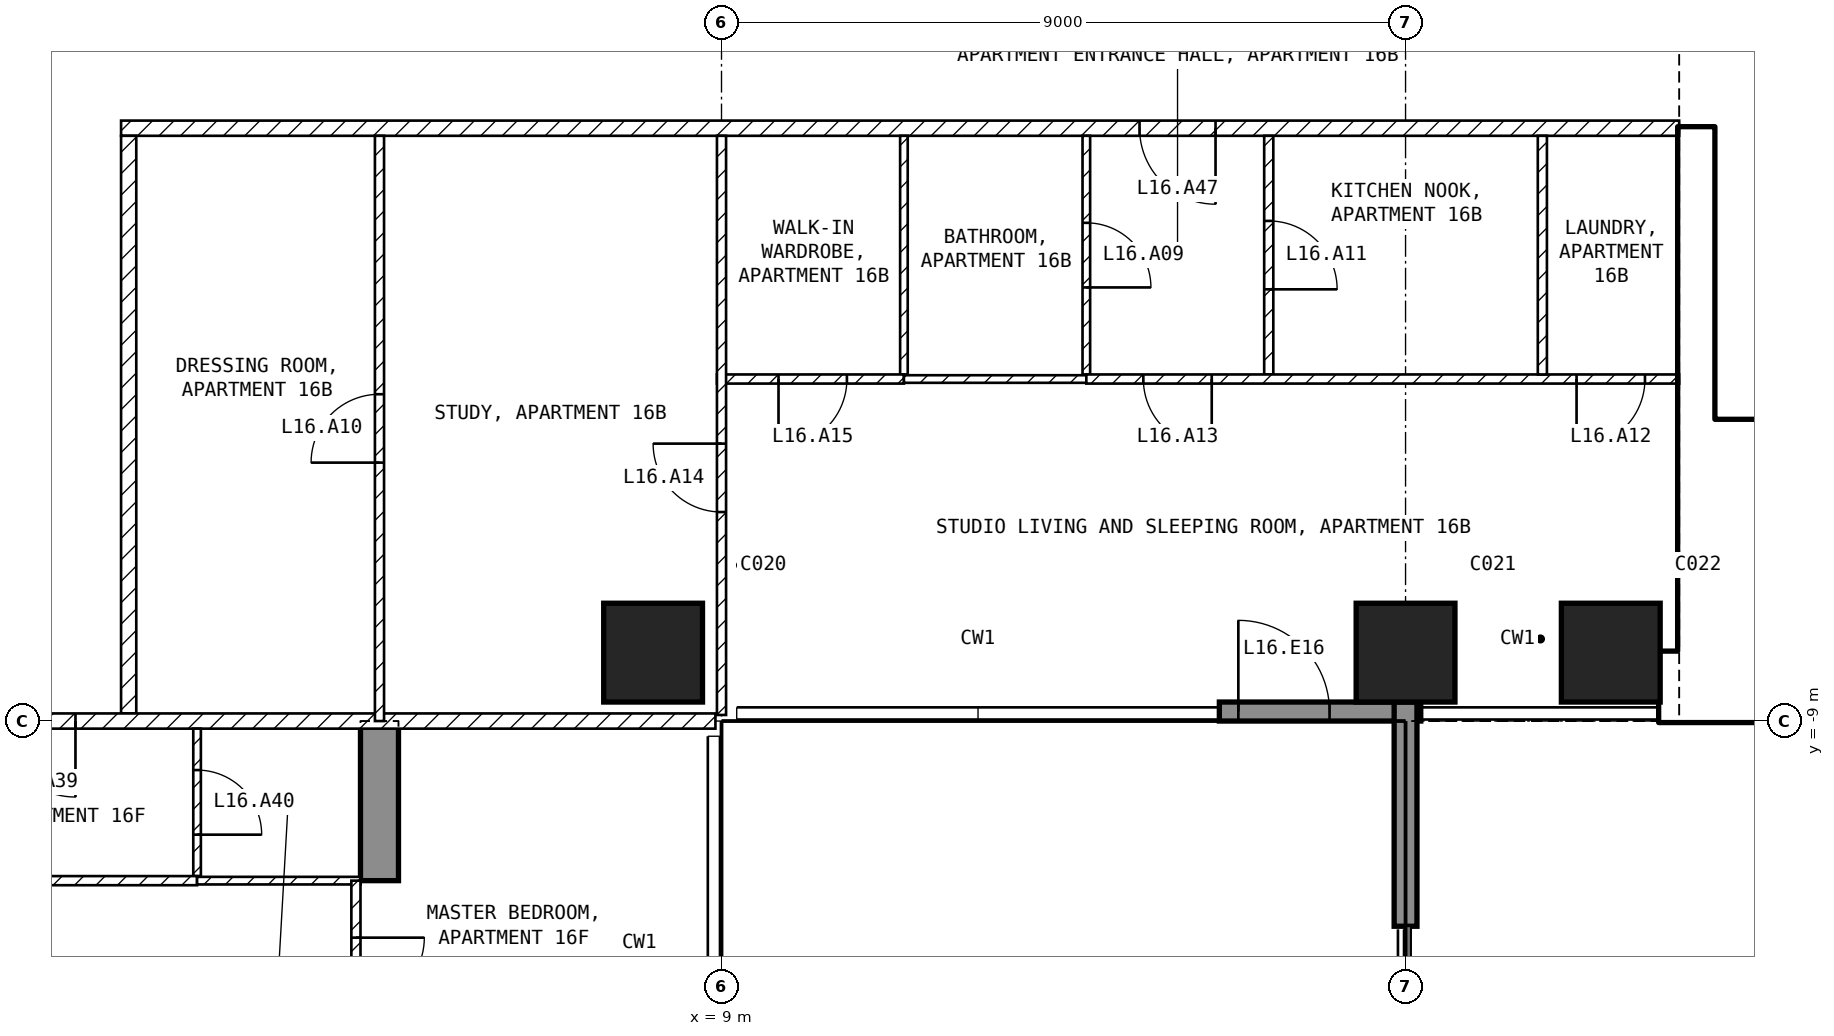
"""IFC4 building model, lengths in metres.
Left out: names, types, materials, properties, quantities, classifications, styles, units other than length and angle.
Written with IfcOpenShell. Run it as: python <this file> out.ifc"""

import sys

from ifc_helpers import new_model, si_unit, direction, frame, frame_2d, origin, origin_2d, place, context, subcontext, project, spatial, polyline, rectangle, outline, extrude, element, fill, save


model = new_model("IFC4")
c1 = context("Model", 3, precision=1e-05, world=origin(), true_north=direction((0.0, 1.0)))
c2 = subcontext(c1, "Body", "Model", "MODEL_VIEW")
j1 = project(units=[si_unit("LENGTHUNIT", "METRE"), si_unit("PLANEANGLEUNIT", "RADIAN")], contexts=[c1])
p1 = place(None, origin())
s1 = spatial("IfcSite", under=j1, at=p1, CompositionType="ELEMENT")
p2 = place(p1, origin())
s2 = spatial("IfcBuilding", under=s1, at=p2, CompositionType="ELEMENT")
p3 = place(p2, frame((0.0, 0.0, 75.0)))
s3 = spatial("IfcBuildingStorey", under=s2, at=p3, CompositionType="ELEMENT", Elevation=75.0)
for number, where, z_axis, x_axis in (
    (1, (8.1, -8.1, -0.25), (0.0, 0.0, 1.0), (1.0, 0.0, 0.0)),
    (2, (18.0, -8.1, -0.25), (0.0, 0.0, 1.0), (1.0, 0.0, 0.0)),
    (3, (20.7, -8.1, -0.25), (0.0, 0.0, 1.0), (1.0, 0.0, 0.0)),
):
    element("IfcColumn", number, at=place(p3, frame(where, z_axis=z_axis, x_axis=x_axis)), inside=s3, PredefinedType="COLUMN", context=c2, shape_type="SweptSolid", body=[
        extrude(rectangle(XDim=1.3, YDim=1.3, at=origin_2d()), origin(), (0.0, 0.0, 1.0), 3.5),
    ])
p4 = place(p3, frame((4.25, -25.45, -0.25), z_axis=(1.0, 0.0, 0.0), x_axis=(0.0, 1.0, 0.0)))
e4 = element("IfcWall", 4, at=p4, inside=s3, PredefinedType="SHEAR", context=c2, shape_type="SweptSolid", body=[
    extrude(outline(polyline([(0.0, 0.0), (4.15, 0.0), (4.15, 2.65), (6.55, 2.65), (6.55, 0.0), (11.95, 0.0), (11.95, 2.65), (14.35, 2.65), (14.35, 0.0), (16.45, 0.0), (16.45, 3.5), (0.0, 3.5), (0.0, 0.0)])), origin(), (0.0, 0.0, 1.0), 0.5),
])
p5 = place(p3, frame((15.55, -8.875, 0.0), z_axis=(0.0, 0.0, 1.0), x_axis=(1.0, 0.0, 0.0)))
e5 = element("IfcWall", 5, at=p5, inside=s3, PredefinedType="SOLIDWALL", context=c2, shape_type="SweptSolid", body=[
    extrude(rectangle(XDim=2.65, YDim=0.25, at=frame_2d((1.325, 0.0))), origin(), (0.0, 0.0, 1.0), 3.25),
])
p6 = place(p5, frame((0.25, 0.0, 0.0)))
e6 = element("IfcOpeningElement", 6, at=p6, cuts=e5, PredefinedType="OPENING", context=c2, shape_type="SweptSolid", body=[
    extrude(rectangle(XDim=1.2, YDim=2.4, at=frame_2d((0.6, 1.2))), frame((0.0, 0.135, 0.0), z_axis=(0.0, -1.0, 0.0), x_axis=(1.0, 0.0, 0.0)), (0.0, 0.0, 1.0), 0.27),
])
p7 = place(p3, frame((18.0, -8.75, 0.0), z_axis=(0.0, 0.0, 1.0), x_axis=(0.0, -1.0, 0.0)))
e7 = element("IfcWall", 7, at=p7, inside=s3, PredefinedType="SOLIDWALL", context=c2, shape_type="SweptSolid", body=[
    extrude(rectangle(XDim=2.95, YDim=0.3, at=frame_2d((1.475, 0.0))), origin(), (0.0, 0.0, 1.0), 3.25),
])
p8 = place(p3, frame((21.35, -8.55, 0.0), z_axis=(0.0, 0.0, 1.0), x_axis=(1.0, 0.0, 0.0)))
e8 = element("IfcWall", 8, at=p8, inside=s3, PredefinedType="SHEAR", context=c2, shape_type="SweptSolid", body=[
    extrude(rectangle(XDim=11.05, YDim=0.9, at=frame_2d((5.525, 0.0))), origin(), (0.0, 0.0, 1.0), 3.25),
])
p9 = place(p3, frame((21.825, -8.1, 0.0), z_axis=(0.0, 0.0, 1.0), x_axis=(0.0, 1.0, 0.0)))
e9 = element("IfcWall", 9, at=p9, inside=s3, PredefinedType="SHEAR", context=c2, shape_type="SweptSolid", body=[
    extrude(rectangle(XDim=6.9, YDim=0.45, at=frame_2d((3.45, 0.0))), origin(), (0.0, 0.0, 1.0), 3.25),
])
p10 = place(p3, frame((22.05, -5.15, 0.0), z_axis=(0.0, 0.0, 1.0), x_axis=(1.0, 0.0, 0.0)))
e10 = element("IfcWall", 10, at=p10, inside=s3, PredefinedType="SOLIDWALL", context=c2, shape_type="SweptSolid", body=[
    extrude(rectangle(XDim=6.3, YDim=0.2, at=frame_2d((3.15, 0.0))), origin(), (0.0, 0.0, 1.0), 3.25),
])
p11 = place(p10, frame((0.2, 0.0, 0.0)))
e11 = element("IfcOpeningElement", 11, at=p11, cuts=e10, PredefinedType="OPENING", context=c2, shape_type="SweptSolid", body=[
    extrude(rectangle(XDim=1.0, YDim=2.1, at=frame_2d((0.5, 1.05))), frame((0.0, 0.11, 0.0), z_axis=(0.0, -1.0, 0.0), x_axis=(1.0, 0.0, 0.0)), (0.0, 0.0, 1.0), 0.22),
])
p12 = place(p3, frame((21.6, -1.2, 0.0), z_axis=(0.0, 0.0, 1.0), x_axis=(-1.0, 0.0, 0.0)))
e12 = element("IfcWall", 12, at=p12, inside=s3, PredefinedType="PARTITIONING", context=c2, shape_type="SweptSolid", body=[
    extrude(rectangle(XDim=20.5, YDim=0.2, at=frame_2d((10.25, 0.0))), origin(), (0.0, 0.0, 1.0), 3.25),
])
p13 = place(p12, frame((6.1, 0.0, 0.0)))
e13 = element("IfcOpeningElement", 13, at=p13, cuts=e12, PredefinedType="OPENING", context=c2, shape_type="SweptSolid", body=[
    extrude(rectangle(XDim=1.0, YDim=2.1, at=frame_2d((0.5, 1.05))), frame((0.0, 0.11, 0.0), z_axis=(0.0, -1.0, 0.0), x_axis=(1.0, 0.0, 0.0)), (0.0, 0.0, 1.0), 0.22),
])
p14 = place(p3, frame((1.2, -1.3, 0.0), z_axis=(0.0, 0.0, 1.0), x_axis=(0.0, -1.0, 0.0)))
e14 = element("IfcWall", 14, at=p14, inside=s3, PredefinedType="PARTITIONING", context=c2, shape_type="SweptSolid", body=[
    extrude(rectangle(XDim=7.6, YDim=0.2, at=frame_2d((3.8, 0.0))), origin(), (0.0, 0.0, 1.0), 3.25),
])
p15 = place(p3, frame((8.92, -9.0, 0.0), z_axis=(0.0, 0.0, 1.0), x_axis=(-1.0, 0.0, 0.0)))
e15 = element("IfcWall", 15, at=p15, inside=s3, PredefinedType="PARTITIONING", context=c2, shape_type="SweptSolid", body=[
    extrude(rectangle(XDim=17.84, YDim=0.2, at=frame_2d((8.92, 0.0))), origin(), (0.0, 0.0, 1.0), 3.25),
])
p16 = place(p15, frame((8.42, 0.0, 0.0)))
e16 = element("IfcOpeningElement", 16, at=p16, cuts=e15, PredefinedType="OPENING", context=c2, shape_type="SweptSolid", body=[
    extrude(rectangle(XDim=1.0, YDim=2.1, at=frame_2d((0.5, 1.05))), frame((0.0, 0.11, 0.0), z_axis=(0.0, -1.0, 0.0), x_axis=(1.0, 0.0, 0.0)), (0.0, 0.0, 1.0), 0.22),
])
p17 = place(p3, frame((11.4, -1.3, 0.0), z_axis=(0.0, 0.0, 1.0), x_axis=(0.0, -1.0, 0.0)))
e17 = element("IfcWall", 17, at=p17, inside=s3, PredefinedType="PARTITIONING", context=c2, shape_type="SweptSolid", body=[
    extrude(rectangle(XDim=3.14, YDim=0.1, at=frame_2d((1.57, 0.0))), origin(), (0.0, 0.0, 1.0), 3.25),
])
p18 = place(p3, frame((11.4, -4.5, 0.0), z_axis=(0.0, 0.0, 1.0), x_axis=(-1.0, 0.0, 0.0)))
e18 = element("IfcWall", 18, at=p18, inside=s3, PredefinedType="PARTITIONING", context=c2, shape_type="SweptSolid", body=[
    extrude(rectangle(XDim=2.46, YDim=0.12, at=frame_2d((1.23, 0.0))), origin(), (0.0, 0.0, 1.0), 3.25),
])
p19 = place(p18, frame((0.75, 0.0, 0.0)))
e19 = element("IfcOpeningElement", 19, at=p19, cuts=e18, PredefinedType="OPENING", context=c2, shape_type="SweptSolid", body=[
    extrude(rectangle(XDim=0.9, YDim=2.1, at=frame_2d((0.45, 1.05))), frame((0.0, 0.07, 0.0), z_axis=(0.0, -1.0, 0.0), x_axis=(1.0, 0.0, 0.0)), (0.0, 0.0, 1.0), 0.14),
])
p20 = place(p3, frame((9.0, -8.92, 0.0), z_axis=(0.0, 0.0, 1.0), x_axis=(0.0, 1.0, 0.0)))
e20 = element("IfcWall", 20, at=p20, inside=s3, PredefinedType="PARTITIONING", context=c2, shape_type="SweptSolid", body=[
    extrude(rectangle(XDim=7.62, YDim=0.12, at=frame_2d((3.81, 0.0))), origin(), (0.0, 0.0, 1.0), 3.25),
])
p21 = place(p20, frame((2.67, 0.0, 0.0)))
e21 = element("IfcOpeningElement", 21, at=p21, cuts=e20, PredefinedType="OPENING", context=c2, shape_type="SweptSolid", body=[
    extrude(rectangle(XDim=0.9, YDim=2.1, at=frame_2d((0.45, 1.05))), frame((0.0, 0.07, 0.0), z_axis=(0.0, -1.0, 0.0), x_axis=(1.0, 0.0, 0.0)), (0.0, 0.0, 1.0), 0.14),
])
p22 = place(p3, frame((13.8, -1.3, 0.0), z_axis=(0.0, 0.0, 1.0), x_axis=(0.0, -1.0, 0.0)))
e22 = element("IfcWall", 22, at=p22, inside=s3, PredefinedType="PARTITIONING", context=c2, shape_type="SweptSolid", body=[
    extrude(rectangle(XDim=3.14, YDim=0.1, at=frame_2d((1.57, 0.0))), origin(), (0.0, 0.0, 1.0), 3.25),
])
p23 = place(p22, frame((1.145, 0.0, 0.0)))
e23 = element("IfcOpeningElement", 23, at=p23, cuts=e22, PredefinedType="OPENING", context=c2, shape_type="SweptSolid", body=[
    extrude(rectangle(XDim=0.85, YDim=2.1, at=frame_2d((0.425, 1.05))), frame((0.0, 0.06, 0.0), z_axis=(0.0, -1.0, 0.0), x_axis=(1.0, 0.0, 0.0)), (0.0, 0.0, 1.0), 0.12),
])
p24 = place(p3, frame((13.8, -4.5, 0.0), z_axis=(0.0, 0.0, 1.0), x_axis=(-1.0, 0.0, 0.0)))
e24 = element("IfcWall", 24, at=p24, inside=s3, PredefinedType="PARTITIONING", context=c2, shape_type="SweptSolid", body=[
    extrude(rectangle(XDim=2.4, YDim=0.1, at=frame_2d((1.2, 0.0))), origin(), (0.0, 0.0, 1.0), 3.25),
])
p25 = place(p3, frame((16.2, -1.3, 0.0), z_axis=(0.0, 0.0, 1.0), x_axis=(0.0, -1.0, 0.0)))
e25 = element("IfcWall", 25, at=p25, inside=s3, PredefinedType="PARTITIONING", context=c2, shape_type="SweptSolid", body=[
    extrude(rectangle(XDim=3.14, YDim=0.12, at=frame_2d((1.57, 0.0))), origin(), (0.0, 0.0, 1.0), 3.25),
])
p26 = place(p25, frame((1.12, 0.0, 0.0)))
e26 = element("IfcOpeningElement", 26, at=p26, cuts=e25, PredefinedType="OPENING", context=c2, shape_type="SweptSolid", body=[
    extrude(rectangle(XDim=0.9, YDim=2.1, at=frame_2d((0.45, 1.05))), frame((0.0, 0.07, 0.0), z_axis=(0.0, -1.0, 0.0), x_axis=(1.0, 0.0, 0.0)), (0.0, 0.0, 1.0), 0.14),
])
p27 = place(p3, frame((21.6, -4.5, 0.0), z_axis=(0.0, 0.0, 1.0), x_axis=(-1.0, 0.0, 0.0)))
e27 = element("IfcWall", 27, at=p27, inside=s3, PredefinedType="PARTITIONING", context=c2, shape_type="SweptSolid", body=[
    extrude(rectangle(XDim=7.8, YDim=0.12, at=frame_2d((3.9, 0.0))), origin(), (0.0, 0.0, 1.0), 3.25),
])
p28 = place(p27, frame((0.45, 0.0, 0.0)))
e28 = element("IfcOpeningElement", 28, at=p28, cuts=e27, PredefinedType="OPENING", context=c2, shape_type="SweptSolid", body=[
    extrude(rectangle(XDim=0.9, YDim=2.1, at=frame_2d((0.45, 1.05))), frame((0.0, 0.07, 0.0), z_axis=(0.0, -1.0, 0.0), x_axis=(1.0, 0.0, 0.0)), (0.0, 0.0, 1.0), 0.14),
])
p29 = place(p27, frame((6.15, 0.0, 0.0)))
e29 = element("IfcOpeningElement", 29, at=p29, cuts=e27, PredefinedType="OPENING", context=c2, shape_type="SweptSolid", body=[
    extrude(rectangle(XDim=0.9, YDim=2.1, at=frame_2d((0.45, 1.05))), frame((0.0, 0.07, 0.0), z_axis=(0.0, -1.0, 0.0), x_axis=(1.0, 0.0, 0.0)), (0.0, 0.0, 1.0), 0.14),
])
p30 = place(p3, frame((19.8, -1.3, 0.0), z_axis=(0.0, 0.0, 1.0), x_axis=(0.0, -1.0, 0.0)))
e30 = element("IfcWall", 30, at=p30, inside=s3, PredefinedType="PARTITIONING", context=c2, shape_type="SweptSolid", body=[
    extrude(rectangle(XDim=3.14, YDim=0.12, at=frame_2d((1.57, 0.0))), origin(), (0.0, 0.0, 1.0), 3.25),
])
p31 = place(p3, frame((4.5, -9.0, 0.0), z_axis=(0.0, 0.0, 1.0), x_axis=(0.0, 1.0, 0.0)))
e31 = element("IfcWall", 31, at=p31, inside=s3, PredefinedType="PARTITIONING", context=c2, shape_type="SweptSolid", body=[
    extrude(rectangle(XDim=7.7, YDim=0.12, at=frame_2d((3.85, 0.0))), origin(), (0.0, 0.0, 1.0), 3.25),
])
p32 = place(p31, frame((3.4, 0.0, 0.0)))
e32 = element("IfcOpeningElement", 32, at=p32, cuts=e31, PredefinedType="OPENING", context=c2, shape_type="SweptSolid", body=[
    extrude(rectangle(XDim=0.9, YDim=2.1, at=frame_2d((0.45, 1.05))), frame((0.0, 0.07, 0.0), z_axis=(0.0, -1.0, 0.0), x_axis=(1.0, 0.0, 0.0)), (0.0, 0.0, 1.0), 0.14),
])
p33 = place(p3, frame((2.1, -9.1, 0.0), z_axis=(0.0, 0.0, 1.0), x_axis=(0.0, -1.0, 0.0)))
e33 = element("IfcWall", 33, at=p33, inside=s3, PredefinedType="PARTITIONING", context=c2, shape_type="SweptSolid", body=[
    extrude(rectangle(XDim=1.94, YDim=0.1, at=frame_2d((0.97, 0.0))), origin(), (0.0, 0.0, 1.0), 3.25),
])
p34 = place(p33, frame((0.545, 0.0, 0.0)))
e34 = element("IfcOpeningElement", 34, at=p34, cuts=e33, PredefinedType="OPENING", context=c2, shape_type="SweptSolid", body=[
    extrude(rectangle(XDim=0.85, YDim=2.1, at=frame_2d((0.425, 1.05))), frame((0.0, 0.06, 0.0), z_axis=(0.0, -1.0, 0.0), x_axis=(1.0, 0.0, 0.0)), (0.0, 0.0, 1.0), 0.12),
])
p35 = place(p3, frame((2.1, -11.1, 0.0), z_axis=(0.0, 0.0, 1.0), x_axis=(-1.0, 0.0, 0.0)))
e35 = element("IfcWall", 35, at=p35, inside=s3, PredefinedType="PARTITIONING", context=c2, shape_type="SweptSolid", body=[
    extrude(rectangle(XDim=6.35, YDim=0.12, at=frame_2d((3.175, 0.0))), origin(), (0.0, 0.0, 1.0), 3.25),
])
p36 = place(p35, frame((2.725, 0.0, 0.0)))
e36 = element("IfcOpeningElement", 36, at=p36, cuts=e35, PredefinedType="OPENING", context=c2, shape_type="SweptSolid", body=[
    extrude(rectangle(XDim=0.9, YDim=2.1, at=frame_2d((0.45, 1.05))), frame((0.0, 0.07, 0.0), z_axis=(0.0, -1.0, 0.0), x_axis=(1.0, 0.0, 0.0)), (0.0, 0.0, 1.0), 0.14),
])
p37 = place(p3, frame((4.25, -11.1, 0.0), z_axis=(0.0, 0.0, 1.0), x_axis=(-1.0, 0.0, 0.0)))
e37 = element("IfcWall", 37, at=p37, inside=s3, PredefinedType="PARTITIONING", context=c2, shape_type="SweptSolid", body=[
    extrude(rectangle(XDim=2.15, YDim=0.1, at=frame_2d((1.075, 0.0))), origin(), (0.0, 0.0, 1.0), 3.25),
])
p38 = place(p3, frame((4.19, -11.1, 0.0), z_axis=(0.0, 0.0, 1.0), x_axis=(0.0, -1.0, 0.0)))
e38 = element("IfcWall", 38, at=p38, inside=s3, PredefinedType="PARTITIONING", context=c2, shape_type="SweptSolid", body=[
    extrude(rectangle(XDim=2.4, YDim=0.12, at=frame_2d((1.2, 0.0))), origin(), (0.0, 0.0, 1.0), 2.4),
])
p39 = place(p38, frame((0.75, 0.0, 0.0)))
e39 = element("IfcOpeningElement", 39, at=p39, cuts=e38, PredefinedType="OPENING", context=c2, shape_type="SweptSolid", body=[
    extrude(rectangle(XDim=0.9, YDim=2.1, at=frame_2d((0.45, 1.05))), frame((0.0, 0.07, 0.0), z_axis=(0.0, -1.0, 0.0), x_axis=(1.0, 0.0, 0.0)), (0.0, 0.0, 1.0), 0.14),
])
p40 = place(p6, origin())
e40 = element("IfcDoor", 40, at=p40, inside=s3, OperationType="SINGLE_SWING_LEFT", PredefinedType="DOOR", context=c2, shape_type="SweptSolid", body=[
    extrude(rectangle(XDim=1.2, YDim=2.4, at=frame_2d((0.6, 1.2))), frame((0.0, 0.025, 0.0), z_axis=(0.0, -1.0, 0.0), x_axis=(1.0, 0.0, 0.0)), (0.0, 0.0, 1.0), 0.05),
])
fill(e6, e40)
p41 = place(p11, origin())
e41 = element("IfcDoor", 41, at=p41, inside=s3, OperationType="SINGLE_SWING_LEFT", PredefinedType="DOOR", context=c2, shape_type="SweptSolid", body=[
    extrude(rectangle(XDim=1.0, YDim=2.1, at=frame_2d((0.5, 1.05))), frame((0.0, 0.025, 0.0), z_axis=(0.0, -1.0, 0.0), x_axis=(1.0, 0.0, 0.0)), (0.0, 0.0, 1.0), 0.05),
])
fill(e11, e41)
p42 = place(p23, origin())
e42 = element("IfcDoor", 42, at=p42, inside=s3, OperationType="SINGLE_SWING_RIGHT", PredefinedType="DOOR", context=c2, shape_type="SweptSolid", body=[
    extrude(rectangle(XDim=0.85, YDim=2.1, at=frame_2d((0.425, 1.05))), frame((0.0, 0.025, 0.0), z_axis=(0.0, -1.0, 0.0), x_axis=(1.0, 0.0, 0.0)), (0.0, 0.0, 1.0), 0.05),
])
fill(e23, e42)
p43 = place(p32, origin())
e43 = element("IfcDoor", 43, at=p43, inside=s3, OperationType="SINGLE_SWING_LEFT", PredefinedType="DOOR", context=c2, shape_type="SweptSolid", body=[
    extrude(rectangle(XDim=0.9, YDim=2.1, at=frame_2d((0.45, 1.05))), frame((0.0, 0.025, 0.0), z_axis=(0.0, -1.0, 0.0), x_axis=(1.0, 0.0, 0.0)), (0.0, 0.0, 1.0), 0.05),
])
fill(e32, e43)
p44 = place(p26, origin())
e44 = element("IfcDoor", 44, at=p44, inside=s3, OperationType="SINGLE_SWING_RIGHT", PredefinedType="DOOR", context=c2, shape_type="SweptSolid", body=[
    extrude(rectangle(XDim=0.9, YDim=2.1, at=frame_2d((0.45, 1.05))), frame((0.0, 0.025, 0.0), z_axis=(0.0, -1.0, 0.0), x_axis=(1.0, 0.0, 0.0)), (0.0, 0.0, 1.0), 0.05),
])
fill(e26, e44)
p45 = place(p28, origin())
e45 = element("IfcDoor", 45, at=p45, inside=s3, OperationType="SINGLE_SWING_RIGHT", PredefinedType="DOOR", context=c2, shape_type="SweptSolid", body=[
    extrude(rectangle(XDim=0.9, YDim=2.1, at=frame_2d((0.45, 1.05))), frame((0.0, 0.025, 0.0), z_axis=(0.0, -1.0, 0.0), x_axis=(1.0, 0.0, 0.0)), (0.0, 0.0, 1.0), 0.05),
])
fill(e28, e45)
p46 = place(p29, origin())
e46 = element("IfcDoor", 46, at=p46, inside=s3, OperationType="SINGLE_SWING_LEFT", PredefinedType="DOOR", context=c2, shape_type="SweptSolid", body=[
    extrude(rectangle(XDim=0.9, YDim=2.1, at=frame_2d((0.45, 1.05))), frame((0.0, 0.025, 0.0), z_axis=(0.0, -1.0, 0.0), x_axis=(1.0, 0.0, 0.0)), (0.0, 0.0, 1.0), 0.05),
])
fill(e29, e46)
p47 = place(p21, origin())
e47 = element("IfcDoor", 47, at=p47, inside=s3, OperationType="SINGLE_SWING_RIGHT", PredefinedType="DOOR", context=c2, shape_type="SweptSolid", body=[
    extrude(rectangle(XDim=0.9, YDim=2.1, at=frame_2d((0.45, 1.05))), frame((0.0, 0.025, 0.0), z_axis=(0.0, -1.0, 0.0), x_axis=(1.0, 0.0, 0.0)), (0.0, 0.0, 1.0), 0.05),
])
fill(e21, e47)
p48 = place(p19, origin())
e48 = element("IfcDoor", 48, at=p48, inside=s3, OperationType="SINGLE_SWING_RIGHT", PredefinedType="DOOR", context=c2, shape_type="SweptSolid", body=[
    extrude(rectangle(XDim=0.9, YDim=2.1, at=frame_2d((0.45, 1.05))), frame((0.0, 0.025, 0.0), z_axis=(0.0, -1.0, 0.0), x_axis=(1.0, 0.0, 0.0)), (0.0, 0.0, 1.0), 0.05),
])
fill(e19, e48)
p49 = place(p16, origin())
e49 = element("IfcDoor", 49, at=p49, inside=s3, OperationType="SINGLE_SWING_LEFT", PredefinedType="DOOR", context=c2, shape_type="SweptSolid", body=[
    extrude(rectangle(XDim=1.0, YDim=2.1, at=frame_2d((0.5, 1.05))), frame((0.0, 0.025, 0.0), z_axis=(0.0, -1.0, 0.0), x_axis=(1.0, 0.0, 0.0)), (0.0, 0.0, 1.0), 0.05),
])
fill(e16, e49)
p50 = place(p34, origin())
e50 = element("IfcDoor", 50, at=p50, inside=s3, OperationType="SINGLE_SWING_RIGHT", PredefinedType="DOOR", context=c2, shape_type="SweptSolid", body=[
    extrude(rectangle(XDim=0.85, YDim=2.1, at=frame_2d((0.425, 1.05))), frame((0.0, 0.025, 0.0), z_axis=(0.0, -1.0, 0.0), x_axis=(1.0, 0.0, 0.0)), (0.0, 0.0, 1.0), 0.05),
])
fill(e34, e50)
p51 = place(p13, origin())
e51 = element("IfcDoor", 51, at=p51, inside=s3, OperationType="SINGLE_SWING_LEFT", PredefinedType="DOOR", context=c2, shape_type="SweptSolid", body=[
    extrude(rectangle(XDim=1.0, YDim=2.1, at=frame_2d((0.5, 1.05))), frame((0.0, 0.025, 0.0), z_axis=(0.0, -1.0, 0.0), x_axis=(1.0, 0.0, 0.0)), (0.0, 0.0, 1.0), 0.05),
])
fill(e13, e51)
p52 = place(p39, origin())
e52 = element("IfcDoor", 52, at=p52, inside=s3, OperationType="SINGLE_SWING_LEFT", PredefinedType="DOOR", context=c2, shape_type="SweptSolid", body=[
    extrude(rectangle(XDim=0.9, YDim=2.1, at=frame_2d((0.45, 1.05))), frame((0.0, 0.025, 0.0), z_axis=(0.0, -1.0, 0.0), x_axis=(1.0, 0.0, 0.0)), (0.0, 0.0, 1.0), 0.05),
])
fill(e39, e52)
save(model, sys.argv[1])
